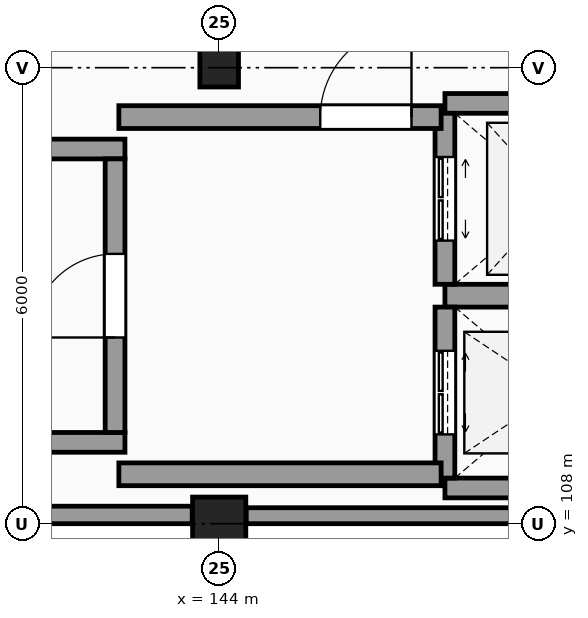
"""IFC4 building model, lengths in metres.
Left out: names, types, materials, properties, quantities, classifications, styles, units other than length and angle.
Written with IfcOpenShell. Run it as: python <this file> out.ifc"""

import sys

from ifc_helpers import new_model, si_unit, direction, frame, frame_2d, origin, origin_2d, place, context, subcontext, project, spatial, rectangle, circle, hollow_circle, extrude, element, fill, save


model = new_model("IFC4")
c1 = context("Model", 3, precision=1e-05, world=origin(), true_north=direction((0.0, 1.0)))
c2 = subcontext(c1, "Body", "Model", "MODEL_VIEW")
j1 = project(units=[si_unit("LENGTHUNIT", "METRE"), si_unit("PLANEANGLEUNIT", "RADIAN")], contexts=[c1])
p1 = place(None, origin())
s1 = spatial("IfcSite", under=j1, at=p1, CompositionType="ELEMENT")
p2 = place(p1, origin())
s2 = spatial("IfcBuilding", under=s1, at=p2, CompositionType="ELEMENT")
p3 = place(p2, frame((0.0, 0.0, 19.8)))
s3 = spatial("IfcBuildingStorey", under=s2, at=p3, CompositionType="ELEMENT", Elevation=19.8)
p4 = place(p3, frame((144.0, 108.0, 0.0), z_axis=(0.0, 0.0, 1.0), x_axis=(1.0, 0.0, 0.0)))
e1 = element("IfcColumn", 1, at=p4, inside=s3, PredefinedType="COLUMN", context=c2, shape_type="SweptSolid", body=[
    extrude(circle(Radius=0.35, at=origin_2d()), origin(), (0.0, 0.0, 1.0), 4.8),
])
p5 = place(p3, frame((144.0, 114.0, 0.0), z_axis=(0.0, 0.0, 1.0), x_axis=(1.0, 0.0, 0.0)))
e2 = element("IfcColumn", 2, at=p5, inside=s3, PredefinedType="COLUMN", context=c2, shape_type="SweptSolid", body=[
    extrude(hollow_circle(Radius=0.254, WallThickness=0.025, at=origin_2d()), origin(), (0.0, 0.0, 1.0), 4.8),
])
p6 = place(p3, frame((138.33, 108.115, 0.0), z_axis=(0.0, 0.0, 1.0), x_axis=(1.0, 0.0, 0.0)))
e3 = element("IfcWall", 3, at=p6, inside=s3, PredefinedType="SOLIDWALL", context=c2, shape_type="SweptSolid", body=[
    extrude(rectangle(XDim=5.315, YDim=0.23, at=frame_2d((2.657, 0.0))), origin(), (0.0, 0.0, 1.0), 3.9),
])
p7 = place(p3, frame((144.355, 108.105, 0.0), z_axis=(0.0, 0.0, 1.0), x_axis=(1.0, 0.0, 0.0)))
e4 = element("IfcWall", 4, at=p7, inside=s3, PredefinedType="SOLIDWALL", context=c2, shape_type="SweptSolid", body=[
    extrude(rectangle(XDim=5.386, YDim=0.21, at=frame_2d((2.693, 0.0))), origin(), (0.0, 0.0, 1.0), 3.9),
])
for number, where, z_axis, x_axis in (
    (5, (132.04, 109.07, 0.0), (0.0, 0.0, 1.0), (1.0, 0.0, 0.0)),
    (6, (132.04, 112.93, 0.0), (0.0, 0.0, 1.0), (1.0, 0.0, 0.0)),
):
    element("IfcWall", number, at=place(p3, frame(where, z_axis=z_axis, x_axis=x_axis)), inside=s3, PredefinedType="SHEAR", context=c2, shape_type="SweptSolid", body=[
        extrude(rectangle(XDim=10.72, YDim=0.26, at=frame_2d((5.36, 0.0))), origin(), (0.0, 0.0, 1.0), 4.8),
    ])
p8 = place(p3, frame((142.63, 109.2, 0.0), z_axis=(0.0, 0.0, 1.0), x_axis=(0.0, 1.0, 0.0)))
e7 = element("IfcWall", 7, at=p8, inside=s3, PredefinedType="SHEAR", context=c2, shape_type="SweptSolid", body=[
    extrude(rectangle(XDim=3.6, YDim=0.26, at=frame_2d((1.8, 0.0))), origin(), (0.0, 0.0, 1.0), 4.8),
])
p9 = place(p8, frame((1.25, 0.0, 0.0)))
e8 = element("IfcOpeningElement", 8, at=p9, cuts=e7, PredefinedType="OPENING", context=c2, shape_type="SweptSolid", body=[
    extrude(rectangle(XDim=1.1, YDim=2.15, at=frame_2d((0.55, 1.075))), frame((0.0, 0.14, 0.0), z_axis=(0.0, -1.0, 0.0), x_axis=(1.0, 0.0, 0.0)), (0.0, 0.0, 1.0), 0.28),
])
p10 = place(p3, frame((146.97, 108.47, 0.0), z_axis=(0.0, 0.0, 1.0), x_axis=(1.0, 0.0, 0.0)))
e9 = element("IfcWall", 9, at=p10, inside=s3, PredefinedType="SHEAR", context=c2, shape_type="SweptSolid", body=[
    extrude(rectangle(XDim=2.91, YDim=0.26, at=frame_2d((1.455, 0.0))), origin(), (0.0, 0.0, 1.0), 4.8),
])
p11 = place(p3, frame((146.97, 111.0, 0.0), z_axis=(0.0, 0.0, 1.0), x_axis=(1.0, 0.0, 0.0)))
e10 = element("IfcWall", 10, at=p11, inside=s3, PredefinedType="SHEAR", context=c2, shape_type="SweptSolid", body=[
    extrude(rectangle(XDim=2.91, YDim=0.3, at=frame_2d((1.455, 0.0))), origin(), (0.0, 0.0, 1.0), 4.8),
])
p12 = place(p3, frame((146.97, 108.6, 0.0), z_axis=(0.0, 0.0, 1.0), x_axis=(0.0, 1.0, 0.0)))
e11 = element("IfcWall", 11, at=p12, inside=s3, PredefinedType="SHEAR", context=c2, shape_type="SweptSolid", body=[
    extrude(rectangle(XDim=2.25, YDim=0.26, at=frame_2d((1.125, 0.0))), origin(), (0.0, 0.0, 1.0), 4.8),
])
p13 = place(p12, frame((0.575, 0.0, 0.0)))
e12 = element("IfcOpeningElement", 12, at=p13, cuts=e11, PredefinedType="OPENING", context=c2, shape_type="SweptSolid", body=[
    extrude(rectangle(XDim=1.1, YDim=2.2, at=frame_2d((0.55, 1.1))), frame((0.0, 0.14, 0.0), z_axis=(0.0, -1.0, 0.0), x_axis=(1.0, 0.0, 0.0)), (0.0, 0.0, 1.0), 0.28),
])
p14 = place(p3, frame((146.97, 113.53, 0.0), z_axis=(0.0, 0.0, 1.0), x_axis=(1.0, 0.0, 0.0)))
e13 = element("IfcWall", 13, at=p14, inside=s3, PredefinedType="SHEAR", context=c2, shape_type="SweptSolid", body=[
    extrude(rectangle(XDim=2.91, YDim=0.26, at=frame_2d((1.455, 0.0))), origin(), (0.0, 0.0, 1.0), 4.8),
])
p15 = place(p3, frame((146.97, 111.15, 0.0), z_axis=(0.0, 0.0, 1.0), x_axis=(0.0, 1.0, 0.0)))
e14 = element("IfcWall", 14, at=p15, inside=s3, PredefinedType="SHEAR", context=c2, shape_type="SweptSolid", body=[
    extrude(rectangle(XDim=2.25, YDim=0.26, at=frame_2d((1.125, 0.0))), origin(), (0.0, 0.0, 1.0), 4.8),
])
p16 = place(p15, frame((0.575, 0.0, 0.0)))
e15 = element("IfcOpeningElement", 15, at=p16, cuts=e14, PredefinedType="OPENING", context=c2, shape_type="SweptSolid", body=[
    extrude(rectangle(XDim=1.1, YDim=2.2, at=frame_2d((0.55, 1.1))), frame((0.0, 0.14, 0.0), z_axis=(0.0, -1.0, 0.0), x_axis=(1.0, 0.0, 0.0)), (0.0, 0.0, 1.0), 0.28),
])
p17 = place(p3, frame((142.68, 113.35, 0.0), z_axis=(0.0, 0.0, 1.0), x_axis=(1.0, 0.0, 0.0)))
e16 = element("IfcWall", 16, at=p17, inside=s3, PredefinedType="SHEAR", context=c2, shape_type="SweptSolid", body=[
    extrude(rectangle(XDim=4.24, YDim=0.3, at=frame_2d((2.12, 0.0))), origin(), (0.0, 0.0, 1.0), 4.8),
])
p18 = place(p17, frame((2.65, 0.0, 0.0)))
e17 = element("IfcOpeningElement", 17, at=p18, cuts=e16, PredefinedType="OPENING", context=c2, shape_type="SweptSolid", body=[
    extrude(rectangle(XDim=1.2, YDim=2.2, at=frame_2d((0.6, 1.1))), frame((0.0, 0.16, 0.0), z_axis=(0.0, -1.0, 0.0), x_axis=(1.0, 0.0, 0.0)), (0.0, 0.0, 1.0), 0.32),
])
p19 = place(p3, frame((142.68, 108.65, 0.0), z_axis=(0.0, 0.0, 1.0), x_axis=(1.0, 0.0, 0.0)))
e18 = element("IfcWall", 18, at=p19, inside=s3, PredefinedType="SHEAR", context=c2, shape_type="SweptSolid", body=[
    extrude(rectangle(XDim=4.24, YDim=0.3, at=frame_2d((2.12, 0.0))), origin(), (0.0, 0.0, 1.0), 4.8),
])
p20 = place(p9, origin())
e19 = element("IfcDoor", 19, at=p20, inside=s3, OperationType="SINGLE_SWING_LEFT", PredefinedType="DOOR", context=c2, shape_type="SweptSolid", body=[
    extrude(rectangle(XDim=1.1, YDim=2.15, at=frame_2d((0.55, 1.075))), frame((0.0, 0.025, 0.0), z_axis=(0.0, -1.0, 0.0), x_axis=(1.0, 0.0, 0.0)), (0.0, 0.0, 1.0), 0.05),
])
fill(e8, e19)
p21 = place(p13, origin())
e20 = element("IfcDoor", 20, at=p21, inside=s3, OperationType="DOUBLE_DOOR_SLIDING", PredefinedType="DOOR", context=c2, shape_type="SweptSolid", body=[
    extrude(rectangle(XDim=1.1, YDim=2.2, at=frame_2d((0.55, 1.1))), frame((0.0, 0.025, 0.0), z_axis=(0.0, -1.0, 0.0), x_axis=(1.0, 0.0, 0.0)), (0.0, 0.0, 1.0), 0.05),
])
fill(e12, e20)
p22 = place(p16, origin())
e21 = element("IfcDoor", 21, at=p22, inside=s3, OperationType="DOUBLE_DOOR_SLIDING", PredefinedType="DOOR", context=c2, shape_type="SweptSolid", body=[
    extrude(rectangle(XDim=1.1, YDim=2.2, at=frame_2d((0.55, 1.1))), frame((0.0, 0.025, 0.0), z_axis=(0.0, -1.0, 0.0), x_axis=(1.0, 0.0, 0.0)), (0.0, 0.0, 1.0), 0.05),
])
fill(e15, e21)
p23 = place(p18, origin())
e22 = element("IfcDoor", 22, at=p23, inside=s3, OperationType="SINGLE_SWING_RIGHT", PredefinedType="DOOR", context=c2, shape_type="SweptSolid", body=[
    extrude(rectangle(XDim=1.2, YDim=2.2, at=frame_2d((0.6, 1.1))), frame((0.0, 0.025, 0.0), z_axis=(0.0, -1.0, 0.0), x_axis=(1.0, 0.0, 0.0)), (0.0, 0.0, 1.0), 0.05),
])
fill(e17, e22)
save(model, sys.argv[1])
